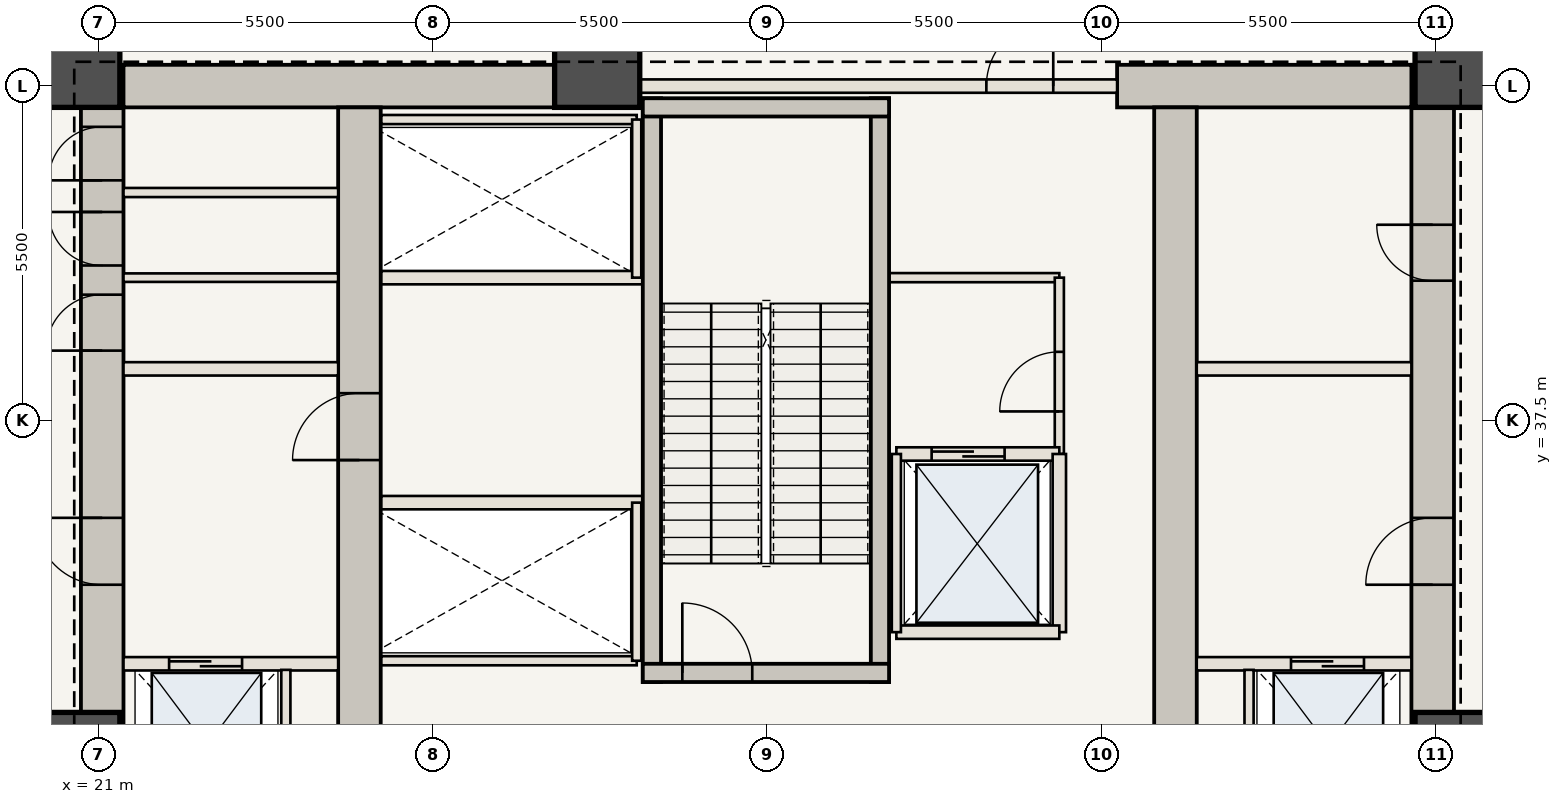
"""IFC4 building model, lengths in metres.
Left out: names, types, materials, properties, quantities, classifications, styles, units other than length and angle.
Written with IfcOpenShell. Run it as: python <this file> out.ifc"""

import sys

from ifc_helpers import new_model, si_unit, direction, frame, frame_2d, origin, origin_2d, place, context, subcontext, project, spatial, rectangle, extrude, element, fill, save


model = new_model("IFC4")
c1 = context("Model", 3, precision=1e-05, world=origin(), true_north=direction((0.0, 1.0)))
c2 = subcontext(c1, "Body", "Model", "MODEL_VIEW")
j1 = project(units=[si_unit("LENGTHUNIT", "METRE"), si_unit("PLANEANGLEUNIT", "RADIAN")], contexts=[c1])
p1 = place(None, origin())
s1 = spatial("IfcSite", under=j1, at=p1, CompositionType="ELEMENT")
p2 = place(p1, origin())
s2 = spatial("IfcBuilding", under=s1, at=p2, CompositionType="ELEMENT")
p3 = place(p2, frame((0.0, 0.0, 12.25)))
s3 = spatial("IfcBuildingStorey", under=s2, at=p3, CompositionType="ELEMENT", Elevation=12.25)
p4 = place(p3, frame((21.06, 30.6, 0.0), z_axis=(0.0, 0.0, 1.0), x_axis=(0.0, 1.0, 0.0)))
e1 = element("IfcWall", 1, at=p4, inside=s3, PredefinedType="SHEAR", context=c2, shape_type="SweptSolid", body=[
    extrude(rectangle(XDim=12.75, YDim=0.7, at=frame_2d((6.375, 0.0))), origin(), (0.0, 0.0, 1.0), 5.6),
])
p5 = place(p4, frame((4.2, 0.0, 0.0)))
e2 = element("IfcOpeningElement", 2, at=p5, cuts=e1, PredefinedType="OPENING", context=c2, shape_type="SweptSolid", body=[
    extrude(rectangle(XDim=1.1, YDim=2.15, at=frame_2d((0.55, 1.075))), frame((0.0, 0.36, 0.0), z_axis=(0.0, -1.0, 0.0), x_axis=(1.0, 0.0, 0.0)), (0.0, 0.0, 1.0), 0.72),
])
p6 = place(p4, frame((8.05, 0.0, 0.0)))
e3 = element("IfcOpeningElement", 3, at=p6, cuts=e1, PredefinedType="OPENING", context=c2, shape_type="SweptSolid", body=[
    extrude(rectangle(XDim=0.92, YDim=2.1, at=frame_2d((0.46, 1.05))), frame((0.0, 0.36, 0.0), z_axis=(0.0, -1.0, 0.0), x_axis=(1.0, 0.0, 0.0)), (0.0, 0.0, 1.0), 0.72),
])
p7 = place(p4, frame((9.45, 0.0, 0.0)))
e4 = element("IfcOpeningElement", 4, at=p7, cuts=e1, PredefinedType="OPENING", context=c2, shape_type="SweptSolid", body=[
    extrude(rectangle(XDim=0.88, YDim=2.1, at=frame_2d((0.44, 1.05))), frame((0.0, 0.36, 0.0), z_axis=(0.0, -1.0, 0.0), x_axis=(1.0, 0.0, 0.0)), (0.0, 0.0, 1.0), 0.72),
])
p8 = place(p4, frame((10.85, 0.0, 0.0)))
e5 = element("IfcOpeningElement", 5, at=p8, cuts=e1, PredefinedType="OPENING", context=c2, shape_type="SweptSolid", body=[
    extrude(rectangle(XDim=0.88, YDim=2.1, at=frame_2d((0.44, 1.05))), frame((0.0, 0.36, 0.0), z_axis=(0.0, -1.0, 0.0), x_axis=(1.0, 0.0, 0.0)), (0.0, 0.0, 1.0), 0.72),
])
p9 = place(p3, frame((42.94, 30.6, 0.0), z_axis=(0.0, 0.0, 1.0), x_axis=(0.0, 1.0, 0.0)))
e6 = element("IfcWall", 6, at=p9, inside=s3, PredefinedType="SHEAR", context=c2, shape_type="SweptSolid", body=[
    extrude(rectangle(XDim=12.75, YDim=0.7, at=frame_2d((6.375, 0.0))), origin(), (0.0, 0.0, 1.0), 5.6),
])
p10 = place(p9, frame((4.2, 0.0, 0.0)))
e7 = element("IfcOpeningElement", 7, at=p10, cuts=e6, PredefinedType="OPENING", context=c2, shape_type="SweptSolid", body=[
    extrude(rectangle(XDim=1.1, YDim=2.15, at=frame_2d((0.55, 1.075))), frame((0.0, 0.36, 0.0), z_axis=(0.0, -1.0, 0.0), x_axis=(1.0, 0.0, 0.0)), (0.0, 0.0, 1.0), 0.72),
])
p11 = place(p9, frame((9.2, 0.0, 0.0)))
e8 = element("IfcOpeningElement", 8, at=p11, cuts=e6, PredefinedType="OPENING", context=c2, shape_type="SweptSolid", body=[
    extrude(rectangle(XDim=0.92, YDim=2.1, at=frame_2d((0.46, 1.05))), frame((0.0, 0.36, 0.0), z_axis=(0.0, -1.0, 0.0), x_axis=(1.0, 0.0, 0.0)), (0.0, 0.0, 1.0), 0.72),
])
p12 = place(p3, frame((21.41, 43.0, 0.0), z_axis=(0.0, 0.0, 1.0), x_axis=(1.0, 0.0, 0.0)))
e9 = element("IfcWall", 9, at=p12, inside=s3, PredefinedType="SHEAR", context=c2, shape_type="SweptSolid", body=[
    extrude(rectangle(XDim=8.24, YDim=0.7, at=frame_2d((4.12, 0.0))), origin(), (0.0, 0.0, 1.0), 5.6),
])
p13 = place(p3, frame((37.75, 43.0, 0.0), z_axis=(0.0, 0.0, 1.0), x_axis=(1.0, 0.0, 0.0)))
e10 = element("IfcWall", 10, at=p13, inside=s3, PredefinedType="SHEAR", context=c2, shape_type="SweptSolid", body=[
    extrude(rectangle(XDim=4.84, YDim=0.7, at=frame_2d((2.42, 0.0))), origin(), (0.0, 0.0, 1.0), 5.6),
])
p14 = place(p3, frame((25.29, 30.6, 0.0), z_axis=(0.0, 0.0, 1.0), x_axis=(0.0, 1.0, 0.0)))
e11 = element("IfcWall", 11, at=p14, inside=s3, PredefinedType="SHEAR", context=c2, shape_type="SweptSolid", body=[
    extrude(rectangle(XDim=12.05, YDim=0.7, at=frame_2d((6.025, 0.0))), origin(), (0.0, 0.0, 1.0), 5.6),
])
p15 = place(p14, frame((6.25, 0.0, 0.0)))
e12 = element("IfcOpeningElement", 12, at=p15, cuts=e11, PredefinedType="OPENING", context=c2, shape_type="SweptSolid", body=[
    extrude(rectangle(XDim=1.1, YDim=2.15, at=frame_2d((0.55, 1.075))), frame((0.0, 0.36, 0.0), z_axis=(0.0, -1.0, 0.0), x_axis=(1.0, 0.0, 0.0)), (0.0, 0.0, 1.0), 0.72),
])
p16 = place(p3, frame((38.71, 30.6, 0.0), z_axis=(0.0, 0.0, 1.0), x_axis=(0.0, 1.0, 0.0)))
e13 = element("IfcWall", 13, at=p16, inside=s3, PredefinedType="SHEAR", context=c2, shape_type="SweptSolid", body=[
    extrude(rectangle(XDim=12.05, YDim=0.7, at=frame_2d((6.025, 0.0))), origin(), (0.0, 0.0, 1.0), 5.6),
])
for number, where, z_axis, x_axis in (
    (14, (43.35, 32.0, 0.0), (0.0, 0.0, 1.0), (1.0, 0.0, 0.0)),
    (15, (43.35, 43.35, 0.0), (0.0, 0.0, 1.0), (1.0, 0.0, 0.0)),
    (16, (29.2, 43.35, 0.0), (0.0, 0.0, 1.0), (1.0, 0.0, 0.0)),
    (17, (20.65, 43.35, 0.0), (0.0, 0.0, 1.0), (1.0, 0.0, 0.0)),
    (18, (20.65, 32.0, 0.0), (0.0, 0.0, 1.0), (1.0, 0.0, 0.0)),
):
    element("IfcColumn", number, at=place(p3, frame(where, z_axis=z_axis, x_axis=x_axis)), inside=s3, PredefinedType="COLUMN", context=c2, shape_type="SweptSolid", body=[
        extrude(rectangle(XDim=1.4, YDim=1.4, at=origin_2d()), origin(), (0.0, 0.0, 1.0), 5.6),
    ])
p17 = place(p3, frame((21.41, 33.5, 0.0), z_axis=(0.0, 0.0, 1.0), x_axis=(1.0, 0.0, 0.0)))
e19 = element("IfcWall", 19, at=p17, inside=s3, PredefinedType="STANDARD", context=c2, shape_type="SweptSolid", body=[
    extrude(rectangle(XDim=3.53, YDim=0.22, at=frame_2d((1.765, 0.0))), origin(), (0.0, 0.0, 1.0), 5.36),
])
p18 = place(p17, frame((0.75, 0.0, 0.0)))
e20 = element("IfcOpeningElement", 20, at=p18, cuts=e19, PredefinedType="OPENING", context=c2, shape_type="SweptSolid", body=[
    extrude(rectangle(XDim=1.2, YDim=2.2, at=frame_2d((0.6, 1.1))), frame((0.0, 0.12, 0.0), z_axis=(0.0, -1.0, 0.0), x_axis=(1.0, 0.0, 0.0)), (0.0, 0.0, 1.0), 0.24),
])
p19 = place(p3, frame((24.08, 30.75, 0.0), z_axis=(0.0, 0.0, 1.0), x_axis=(0.0, 1.0, 0.0)))
e21 = element("IfcWall", 21, at=p19, inside=s3, PredefinedType="STANDARD", context=c2, shape_type="SweptSolid", body=[
    extrude(rectangle(XDim=2.65, YDim=0.15, at=frame_2d((1.325, 0.0))), origin(), (0.0, 0.0, 1.0), 5.36),
])
p20 = place(p3, frame((39.06, 33.5, 0.0), z_axis=(0.0, 0.0, 1.0), x_axis=(1.0, 0.0, 0.0)))
e22 = element("IfcWall", 22, at=p20, inside=s3, PredefinedType="STANDARD", context=c2, shape_type="SweptSolid", body=[
    extrude(rectangle(XDim=3.53, YDim=0.22, at=frame_2d((1.765, 0.0))), origin(), (0.0, 0.0, 1.0), 5.36),
])
p21 = place(p20, frame((1.55, 0.0, 0.0)))
e23 = element("IfcOpeningElement", 23, at=p21, cuts=e22, PredefinedType="OPENING", context=c2, shape_type="SweptSolid", body=[
    extrude(rectangle(XDim=1.2, YDim=2.2, at=frame_2d((0.6, 1.1))), frame((0.0, 0.12, 0.0), z_axis=(0.0, -1.0, 0.0), x_axis=(1.0, 0.0, 0.0)), (0.0, 0.0, 1.0), 0.24),
])
p22 = place(p3, frame((39.92, 30.75, 0.0), z_axis=(0.0, 0.0, 1.0), x_axis=(0.0, 1.0, 0.0)))
e24 = element("IfcWall", 24, at=p22, inside=s3, PredefinedType="STANDARD", context=c2, shape_type="SweptSolid", body=[
    extrude(rectangle(XDim=2.65, YDim=0.15, at=frame_2d((1.325, 0.0))), origin(), (0.0, 0.0, 1.0), 5.36),
])
for number, where, z_axis, x_axis in (
    (25, (21.41, 38.35, 0.0), (0.0, 0.0, 1.0), (1.0, 0.0, 0.0)),
    (26, (39.06, 38.35, 0.0), (0.0, 0.0, 1.0), (1.0, 0.0, 0.0)),
):
    element("IfcWall", number, at=place(p3, frame(where, z_axis=z_axis, x_axis=x_axis)), inside=s3, PredefinedType="STANDARD", context=c2, shape_type="SweptSolid", body=[
        extrude(rectangle(XDim=3.53, YDim=0.22, at=frame_2d((1.765, 0.0))), origin(), (0.0, 0.0, 1.0), 5.36),
    ])
p23 = place(p3, frame((21.41, 39.85, 0.0), z_axis=(0.0, 0.0, 1.0), x_axis=(1.0, 0.0, 0.0)))
e27 = element("IfcWall", 27, at=p23, inside=s3, PredefinedType="STANDARD", context=c2, shape_type="SweptSolid", body=[
    extrude(rectangle(XDim=3.53, YDim=0.14, at=frame_2d((1.765, 0.0))), origin(), (0.0, 0.0, 1.0), 5.36),
])
p24 = place(p3, frame((21.41, 41.25, 0.0), z_axis=(0.0, 0.0, 1.0), x_axis=(1.0, 0.0, 0.0)))
e28 = element("IfcWall", 28, at=p24, inside=s3, PredefinedType="STANDARD", context=c2, shape_type="SweptSolid", body=[
    extrude(rectangle(XDim=3.53, YDim=0.15, at=frame_2d((1.765, 0.0))), origin(), (0.0, 0.0, 1.0), 5.36),
])
p25 = place(p3, frame((34.0, 39.85, 0.0), z_axis=(0.0, 0.0, 1.0), x_axis=(1.0, 0.0, 0.0)))
e29 = element("IfcWall", 29, at=p25, inside=s3, PredefinedType="STANDARD", context=c2, shape_type="SweptSolid", body=[
    extrude(rectangle(XDim=2.8, YDim=0.15, at=frame_2d((1.4, 0.0))), origin(), (0.0, 0.0, 1.0), 5.36),
])
p26 = place(p3, frame((36.8, 36.95, 0.0), z_axis=(0.0, 0.0, 1.0), x_axis=(0.0, 1.0, 0.0)))
e30 = element("IfcWall", 30, at=p26, inside=s3, PredefinedType="STANDARD", context=c2, shape_type="SweptSolid", body=[
    extrude(rectangle(XDim=2.9, YDim=0.15, at=frame_2d((1.45, 0.0))), origin(), (0.0, 0.0, 1.0), 5.36),
])
p27 = place(p26, frame((0.7, 0.0, 0.0)))
e31 = element("IfcOpeningElement", 31, at=p27, cuts=e30, PredefinedType="OPENING", context=c2, shape_type="SweptSolid", body=[
    extrude(rectangle(XDim=0.98, YDim=2.2, at=frame_2d((0.49, 1.1))), frame((0.0, 0.085, 0.0), z_axis=(0.0, -1.0, 0.0), x_axis=(1.0, 0.0, 0.0)), (0.0, 0.0, 1.0), 0.17),
])
p28 = place(p3, frame((25.65, 36.15, 0.0), z_axis=(0.0, 0.0, 1.0), x_axis=(1.0, 0.0, 0.0)))
e32 = element("IfcWall", 32, at=p28, inside=s3, PredefinedType="STANDARD", context=c2, shape_type="SweptSolid", body=[
    extrude(rectangle(XDim=4.3, YDim=0.22, at=frame_2d((2.15, 0.0))), origin(), (0.0, 0.0, 1.0), 5.36),
])
p29 = place(p3, frame((25.65, 33.55, 0.0), z_axis=(0.0, 0.0, 1.0), x_axis=(1.0, 0.0, 0.0)))
e33 = element("IfcWall", 33, at=p29, inside=s3, PredefinedType="STANDARD", context=c2, shape_type="SweptSolid", body=[
    extrude(rectangle(XDim=4.2, YDim=0.15, at=frame_2d((2.1, 0.0))), origin(), (0.0, 0.0, 1.0), 5.36),
])
p30 = place(p3, frame((29.85, 33.55, 0.0), z_axis=(0.0, 0.0, 1.0), x_axis=(0.0, 1.0, 0.0)))
e34 = element("IfcWall", 34, at=p30, inside=s3, PredefinedType="STANDARD", context=c2, shape_type="SweptSolid", body=[
    extrude(rectangle(XDim=2.6, YDim=0.15, at=frame_2d((1.3, 0.0))), origin(), (0.0, 0.0, 1.0), 5.36),
])
p31 = place(p3, frame((25.65, 39.85, 0.0), z_axis=(0.0, 0.0, 1.0), x_axis=(1.0, 0.0, 0.0)))
e35 = element("IfcWall", 35, at=p31, inside=s3, PredefinedType="STANDARD", context=c2, shape_type="SweptSolid", body=[
    extrude(rectangle(XDim=4.3, YDim=0.22, at=frame_2d((2.15, 0.0))), origin(), (0.0, 0.0, 1.0), 5.36),
])
p32 = place(p3, frame((25.65, 42.45, 0.0), z_axis=(0.0, 0.0, 1.0), x_axis=(1.0, 0.0, 0.0)))
e36 = element("IfcWall", 36, at=p32, inside=s3, PredefinedType="STANDARD", context=c2, shape_type="SweptSolid", body=[
    extrude(rectangle(XDim=4.2, YDim=0.15, at=frame_2d((2.1, 0.0))), origin(), (0.0, 0.0, 1.0), 5.36),
])
p33 = place(p3, frame((29.85, 39.85, 0.0), z_axis=(0.0, 0.0, 1.0), x_axis=(0.0, 1.0, 0.0)))
e37 = element("IfcWall", 37, at=p33, inside=s3, PredefinedType="STANDARD", context=c2, shape_type="SweptSolid", body=[
    extrude(rectangle(XDim=2.6, YDim=0.15, at=frame_2d((1.3, 0.0))), origin(), (0.0, 0.0, 1.0), 5.36),
])
for number, where, z_axis, x_axis in (
    (38, (30.1, 33.2, 0.0), (0.0, 0.0, 1.0), (0.0, 1.0, 0.0)),
    (39, (33.85, 33.2, 0.0), (0.0, 0.0, 1.0), (0.0, 1.0, 0.0)),
):
    element("IfcWall", number, at=place(p3, frame(where, z_axis=z_axis, x_axis=x_axis)), inside=s3, PredefinedType="SHEAR", context=c2, shape_type="SweptSolid", body=[
        extrude(rectangle(XDim=9.6, YDim=0.3, at=frame_2d((4.8, 0.0))), origin(), (0.0, 0.0, 1.0), 5.36),
    ])
p34 = place(p3, frame((29.95, 33.35, 0.0), z_axis=(0.0, 0.0, 1.0), x_axis=(1.0, 0.0, 0.0)))
e40 = element("IfcWall", 40, at=p34, inside=s3, PredefinedType="SHEAR", context=c2, shape_type="SweptSolid", body=[
    extrude(rectangle(XDim=4.05, YDim=0.3, at=frame_2d((2.025, 0.0))), origin(), (0.0, 0.0, 1.0), 5.36),
])
p35 = place(p34, frame((0.65, 0.0, 0.0)))
e41 = element("IfcOpeningElement", 41, at=p35, cuts=e40, PredefinedType="OPENING", context=c2, shape_type="SweptSolid", body=[
    extrude(rectangle(XDim=1.15, YDim=2.15, at=frame_2d((0.575, 1.075))), frame((0.0, 0.16, 0.0), z_axis=(0.0, -1.0, 0.0), x_axis=(1.0, 0.0, 0.0)), (0.0, 0.0, 1.0), 0.32),
])
p36 = place(p3, frame((29.95, 42.65, 0.0), z_axis=(0.0, 0.0, 1.0), x_axis=(1.0, 0.0, 0.0)))
e42 = element("IfcWall", 42, at=p36, inside=s3, PredefinedType="SHEAR", context=c2, shape_type="SweptSolid", body=[
    extrude(rectangle(XDim=4.05, YDim=0.3, at=frame_2d((2.025, 0.0))), origin(), (0.0, 0.0, 1.0), 5.36),
])
p37 = place(p3, frame((29.65, 43.0, 0.0), z_axis=(0.0, 0.0, 1.0), x_axis=(1.0, 0.0, 0.0)))
e43 = element("IfcWall", 43, at=p37, inside=s3, PredefinedType="STANDARD", context=c2, shape_type="SweptSolid", body=[
    extrude(rectangle(XDim=8.1, YDim=0.22, at=frame_2d((4.05, 0.0))), origin(), (0.0, 0.0, 1.0), 5.36),
])
p38 = place(p37, frame((5.95, 0.0, 0.0)))
e44 = element("IfcOpeningElement", 44, at=p38, cuts=e43, PredefinedType="OPENING", context=c2, shape_type="SweptSolid", body=[
    extrude(rectangle(XDim=1.1, YDim=2.15, at=frame_2d((0.55, 1.075))), frame((0.0, 0.12, 0.0), z_axis=(0.0, -1.0, 0.0), x_axis=(1.0, 0.0, 0.0)), (0.0, 0.0, 1.0), 0.24),
])
p39 = place(p3, frame((34.12, 36.95, 0.0), z_axis=(0.0, 0.0, 1.0), x_axis=(1.0, 0.0, 0.0)))
e45 = element("IfcWall", 45, at=p39, inside=s3, PredefinedType="STANDARD", context=c2, shape_type="SweptSolid", body=[
    extrude(rectangle(XDim=2.68, YDim=0.22, at=frame_2d((1.34, 0.0))), origin(), (0.0, 0.0, 1.0), 5.36),
])
p40 = place(p39, frame((0.58, 0.0, 0.0)))
e46 = element("IfcOpeningElement", 46, at=p40, cuts=e45, PredefinedType="OPENING", context=c2, shape_type="SweptSolid", body=[
    extrude(rectangle(XDim=1.2, YDim=2.2, at=frame_2d((0.6, 1.1))), frame((0.0, 0.12, 0.0), z_axis=(0.0, -1.0, 0.0), x_axis=(1.0, 0.0, 0.0)), (0.0, 0.0, 1.0), 0.24),
])
p41 = place(p3, frame((36.8, 34.02, 0.0), z_axis=(0.0, 0.0, 1.0), x_axis=(0.0, 1.0, 0.0)))
e47 = element("IfcWall", 47, at=p41, inside=s3, PredefinedType="STANDARD", context=c2, shape_type="SweptSolid", body=[
    extrude(rectangle(XDim=2.93, YDim=0.22, at=frame_2d((1.465, 0.0))), origin(), (0.0, 0.0, 1.0), 5.36),
])
p42 = place(p3, frame((34.12, 34.02, 0.0), z_axis=(0.0, 0.0, 1.0), x_axis=(1.0, 0.0, 0.0)))
e48 = element("IfcWall", 48, at=p42, inside=s3, PredefinedType="STANDARD", context=c2, shape_type="SweptSolid", body=[
    extrude(rectangle(XDim=2.68, YDim=0.22, at=frame_2d((1.34, 0.0))), origin(), (0.0, 0.0, 1.0), 5.36),
])
p43 = place(p3, frame((34.12, 34.02, 0.0), z_axis=(0.0, 0.0, 1.0), x_axis=(0.0, 1.0, 0.0)))
e49 = element("IfcWall", 49, at=p43, inside=s3, PredefinedType="STANDARD", context=c2, shape_type="SweptSolid", body=[
    extrude(rectangle(XDim=2.93, YDim=0.15, at=frame_2d((1.465, 0.0))), origin(), (0.0, 0.0, 1.0), 5.36),
])
p44 = place(p5, origin())
e50 = element("IfcDoor", 50, at=p44, inside=s3, OperationType="SINGLE_SWING_RIGHT", PredefinedType="DOOR", context=c2, shape_type="SweptSolid", body=[
    extrude(rectangle(XDim=1.1, YDim=2.15, at=frame_2d((0.55, 1.075))), frame((0.0, 0.025, 0.0), z_axis=(0.0, -1.0, 0.0), x_axis=(1.0, 0.0, 0.0)), (0.0, 0.0, 1.0), 0.05),
])
fill(e2, e50)
p45 = place(p10, origin())
e51 = element("IfcDoor", 51, at=p45, inside=s3, OperationType="SINGLE_SWING_LEFT", PredefinedType="DOOR", context=c2, shape_type="SweptSolid", body=[
    extrude(rectangle(XDim=1.1, YDim=2.15, at=frame_2d((0.55, 1.075))), frame((0.0, 0.025, 0.0), z_axis=(0.0, -1.0, 0.0), x_axis=(1.0, 0.0, 0.0)), (0.0, 0.0, 1.0), 0.05),
])
fill(e7, e51)
p46 = place(p15, origin())
e52 = element("IfcDoor", 52, at=p46, inside=s3, OperationType="SINGLE_SWING_LEFT", PredefinedType="DOOR", context=c2, shape_type="SweptSolid", body=[
    extrude(rectangle(XDim=1.1, YDim=2.15, at=frame_2d((0.55, 1.075))), frame((0.0, 0.025, 0.0), z_axis=(0.0, -1.0, 0.0), x_axis=(1.0, 0.0, 0.0)), (0.0, 0.0, 1.0), 0.05),
])
fill(e12, e52)
p47 = place(p6, origin())
e53 = element("IfcDoor", 53, at=p47, inside=s3, OperationType="SINGLE_SWING_LEFT", PredefinedType="DOOR", context=c2, shape_type="SweptSolid", body=[
    extrude(rectangle(XDim=0.92, YDim=2.1, at=frame_2d((0.46, 1.05))), frame((0.0, 0.025, 0.0), z_axis=(0.0, -1.0, 0.0), x_axis=(1.0, 0.0, 0.0)), (0.0, 0.0, 1.0), 0.05),
])
fill(e3, e53)
p48 = place(p7, origin())
e54 = element("IfcDoor", 54, at=p48, inside=s3, OperationType="SINGLE_SWING_RIGHT", PredefinedType="DOOR", context=c2, shape_type="SweptSolid", body=[
    extrude(rectangle(XDim=0.88, YDim=2.1, at=frame_2d((0.44, 1.05))), frame((0.0, 0.025, 0.0), z_axis=(0.0, -1.0, 0.0), x_axis=(1.0, 0.0, 0.0)), (0.0, 0.0, 1.0), 0.05),
])
fill(e4, e54)
p49 = place(p8, origin())
e55 = element("IfcDoor", 55, at=p49, inside=s3, OperationType="SINGLE_SWING_LEFT", PredefinedType="DOOR", context=c2, shape_type="SweptSolid", body=[
    extrude(rectangle(XDim=0.88, YDim=2.1, at=frame_2d((0.44, 1.05))), frame((0.0, 0.025, 0.0), z_axis=(0.0, -1.0, 0.0), x_axis=(1.0, 0.0, 0.0)), (0.0, 0.0, 1.0), 0.05),
])
fill(e5, e55)
p50 = place(p11, origin())
e56 = element("IfcDoor", 56, at=p50, inside=s3, OperationType="SINGLE_SWING_RIGHT", PredefinedType="DOOR", context=c2, shape_type="SweptSolid", body=[
    extrude(rectangle(XDim=0.92, YDim=2.1, at=frame_2d((0.46, 1.05))), frame((0.0, 0.025, 0.0), z_axis=(0.0, -1.0, 0.0), x_axis=(1.0, 0.0, 0.0)), (0.0, 0.0, 1.0), 0.05),
])
fill(e8, e56)
p51 = place(p18, origin())
e57 = element("IfcDoor", 57, at=p51, inside=s3, OperationType="DOUBLE_DOOR_SLIDING", PredefinedType="DOOR", context=c2, shape_type="SweptSolid", body=[
    extrude(rectangle(XDim=1.2, YDim=2.2, at=frame_2d((0.6, 1.1))), frame((0.0, 0.025, 0.0), z_axis=(0.0, -1.0, 0.0), x_axis=(1.0, 0.0, 0.0)), (0.0, 0.0, 1.0), 0.05),
])
fill(e20, e57)
p52 = place(p21, origin())
e58 = element("IfcDoor", 58, at=p52, inside=s3, OperationType="DOUBLE_DOOR_SLIDING", PredefinedType="DOOR", context=c2, shape_type="SweptSolid", body=[
    extrude(rectangle(XDim=1.2, YDim=2.2, at=frame_2d((0.6, 1.1))), frame((0.0, 0.025, 0.0), z_axis=(0.0, -1.0, 0.0), x_axis=(1.0, 0.0, 0.0)), (0.0, 0.0, 1.0), 0.05),
])
fill(e23, e58)
p53 = place(p27, origin())
e59 = element("IfcDoor", 59, at=p53, inside=s3, OperationType="SINGLE_SWING_LEFT", PredefinedType="DOOR", context=c2, shape_type="SweptSolid", body=[
    extrude(rectangle(XDim=0.98, YDim=2.2, at=frame_2d((0.49, 1.1))), frame((0.0, 0.025, 0.0), z_axis=(0.0, -1.0, 0.0), x_axis=(1.0, 0.0, 0.0)), (0.0, 0.0, 1.0), 0.05),
])
fill(e31, e59)
p54 = place(p35, origin())
e60 = element("IfcDoor", 60, at=p54, inside=s3, OperationType="SINGLE_SWING_LEFT", PredefinedType="DOOR", context=c2, shape_type="SweptSolid", body=[
    extrude(rectangle(XDim=1.15, YDim=2.15, at=frame_2d((0.575, 1.075))), frame((0.0, 0.025, 0.0), z_axis=(0.0, -1.0, 0.0), x_axis=(1.0, 0.0, 0.0)), (0.0, 0.0, 1.0), 0.05),
])
fill(e41, e60)
p55 = place(p38, origin())
e61 = element("IfcDoor", 61, at=p55, inside=s3, OperationType="SINGLE_SWING_RIGHT", PredefinedType="DOOR", context=c2, shape_type="SweptSolid", body=[
    extrude(rectangle(XDim=1.1, YDim=2.15, at=frame_2d((0.55, 1.075))), frame((0.0, 0.025, 0.0), z_axis=(0.0, -1.0, 0.0), x_axis=(1.0, 0.0, 0.0)), (0.0, 0.0, 1.0), 0.05),
])
fill(e44, e61)
p56 = place(p40, origin())
e62 = element("IfcDoor", 62, at=p56, inside=s3, OperationType="DOUBLE_DOOR_SLIDING", PredefinedType="DOOR", context=c2, shape_type="SweptSolid", body=[
    extrude(rectangle(XDim=1.2, YDim=2.2, at=frame_2d((0.6, 1.1))), frame((0.0, 0.025, 0.0), z_axis=(0.0, -1.0, 0.0), x_axis=(1.0, 0.0, 0.0)), (0.0, 0.0, 1.0), 0.05),
])
fill(e46, e62)
save(model, sys.argv[1])
